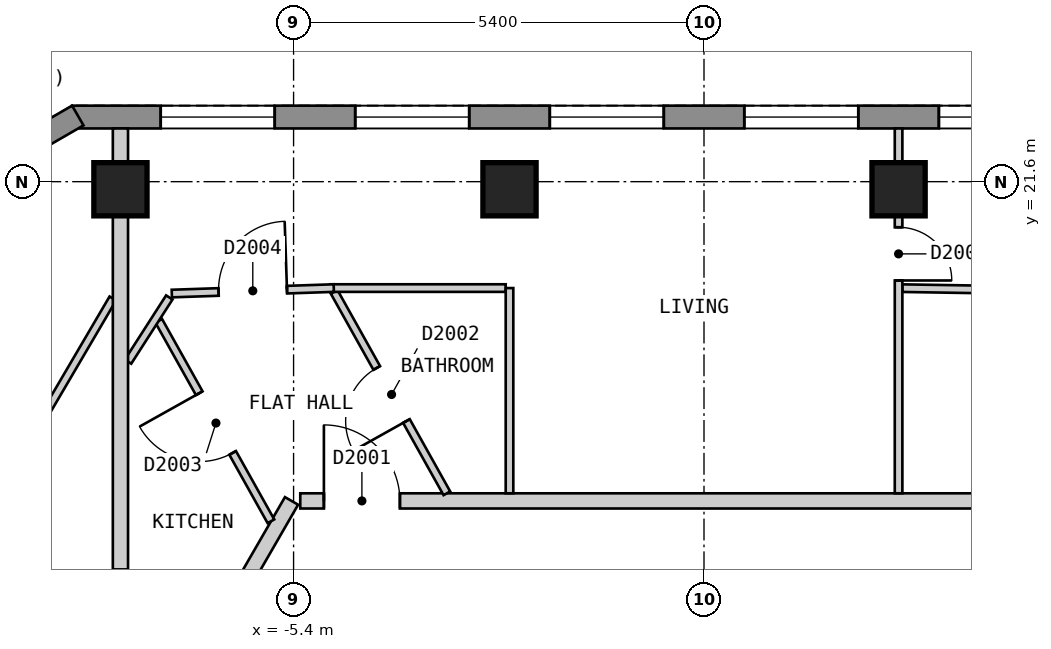
"""IFC4 building model, lengths in metres.
Left out: names, types, materials, properties, quantities, classifications, styles, units other than length and angle.
Written with IfcOpenShell. Run it as: python <this file> out.ifc"""

import sys

from ifc_helpers import new_model, si_unit, direction, frame, frame_2d, origin, origin_2d, place, context, subcontext, project, spatial, polyline, rectangle, outline, extrude, element, fill, save


model = new_model("IFC4")
c1 = context("Model", 3, precision=1e-05, world=origin(), true_north=direction((0.0, 1.0)))
c2 = subcontext(c1, "Body", "Model", "MODEL_VIEW")
j1 = project(units=[si_unit("LENGTHUNIT", "METRE"), si_unit("PLANEANGLEUNIT", "RADIAN")], contexts=[c1])
p1 = place(None, origin())
s1 = spatial("IfcSite", under=j1, at=p1, CompositionType="ELEMENT")
p2 = place(p1, origin())
s2 = spatial("IfcBuilding", under=s1, at=p2, CompositionType="ELEMENT")
p3 = place(p2, frame((0.0, 0.0, 238.8)))
s3 = spatial("IfcBuildingStorey", under=s2, at=p3, CompositionType="ELEMENT", Elevation=238.8)
for number, where, z_axis, x_axis in (
    (1, (2.56, 21.5, 0.0), (0.0, 0.0, 1.0), (-1.0, 0.0, 0.0)),
    (2, (-2.559, 21.5, 0.0), (0.0, 0.0, 1.0), (-1.0, 0.0, 0.0)),
    (3, (-7.678, 21.5, 0.0), (0.0, 0.0, 1.0), (-1.0, 0.0, 0.0)),
):
    element("IfcColumn", number, at=place(p3, frame(where, z_axis=z_axis, x_axis=x_axis)), inside=s3, PredefinedType="COLUMN", context=c2, shape_type="SweptSolid", body=[
        extrude(rectangle(XDim=0.7, YDim=0.7, at=origin_2d()), origin(), (0.0, 0.0, 1.0), 3.0),
    ])
p4 = place(p3, frame((8.314, 22.45, 0.0), z_axis=(0.0, 0.0, 1.0), x_axis=(-1.0, 0.0, 0.0)))
e4 = element("IfcWall", 4, at=p4, inside=s3, PredefinedType="SOLIDWALL", context=c2, shape_type="SweptSolid", body=[
    extrude(outline(polyline([(0.0, -0.15), (16.628, -0.15), (16.548, 0.15), (0.08, 0.15), (0.0, -0.15)])), origin(), (0.0, 0.0, 1.0), 2.7),
])
p5 = place(p4, frame((1.165, 0.0, 0.15)))
e5 = element("IfcOpeningElement", 5, at=p5, cuts=e4, PredefinedType="OPENING", context=c2, shape_type="SweptSolid", body=[
    extrude(rectangle(XDim=1.5, YDim=2.1, at=frame_2d((0.75, 1.05))), frame((0.0, 0.16, 0.0), z_axis=(0.0, -1.0, 0.0), x_axis=(1.0, 0.0, 0.0)), (0.0, 0.0, 1.0), 0.32),
])
p6 = place(p4, frame((3.724, 0.0, 0.15)))
e6 = element("IfcOpeningElement", 6, at=p6, cuts=e4, PredefinedType="OPENING", context=c2, shape_type="SweptSolid", body=[
    extrude(rectangle(XDim=1.5, YDim=2.1, at=frame_2d((0.75, 1.05))), frame((0.0, 0.16, 0.0), z_axis=(0.0, -1.0, 0.0), x_axis=(1.0, 0.0, 0.0)), (0.0, 0.0, 1.0), 0.32),
])
p7 = place(p4, frame((6.284, 0.0, 0.15)))
e7 = element("IfcOpeningElement", 7, at=p7, cuts=e4, PredefinedType="OPENING", context=c2, shape_type="SweptSolid", body=[
    extrude(rectangle(XDim=1.5, YDim=2.1, at=frame_2d((0.75, 1.05))), frame((0.0, 0.16, 0.0), z_axis=(0.0, -1.0, 0.0), x_axis=(1.0, 0.0, 0.0)), (0.0, 0.0, 1.0), 0.32),
])
p8 = place(p4, frame((8.843, 0.0, 0.15)))
e8 = element("IfcOpeningElement", 8, at=p8, cuts=e4, PredefinedType="OPENING", context=c2, shape_type="SweptSolid", body=[
    extrude(rectangle(XDim=1.5, YDim=2.1, at=frame_2d((0.75, 1.05))), frame((0.0, 0.16, 0.0), z_axis=(0.0, -1.0, 0.0), x_axis=(1.0, 0.0, 0.0)), (0.0, 0.0, 1.0), 0.32),
])
p9 = place(p4, frame((11.403, 0.0, 0.15)))
e9 = element("IfcOpeningElement", 9, at=p9, cuts=e4, PredefinedType="OPENING", context=c2, shape_type="SweptSolid", body=[
    extrude(rectangle(XDim=1.5, YDim=2.1, at=frame_2d((0.75, 1.05))), frame((0.0, 0.16, 0.0), z_axis=(0.0, -1.0, 0.0), x_axis=(1.0, 0.0, 0.0)), (0.0, 0.0, 1.0), 0.32),
])
p10 = place(p4, frame((13.962, 0.0, 0.15)))
e10 = element("IfcOpeningElement", 10, at=p10, cuts=e4, PredefinedType="OPENING", context=c2, shape_type="SweptSolid", body=[
    extrude(rectangle(XDim=1.5, YDim=2.1, at=frame_2d((0.75, 1.05))), frame((0.0, 0.16, 0.0), z_axis=(0.0, -1.0, 0.0), x_axis=(1.0, 0.0, 0.0)), (0.0, 0.0, 1.0), 0.32),
])
p11 = place(p3, frame((-8.239, 22.47, 0.0), z_axis=(0.0, 0.0, 1.0), x_axis=(-0.866022959057, -0.500004234368, 0.0)))
e11 = element("IfcWall", 11, at=p11, inside=s3, PredefinedType="SOLIDWALL", context=c2, shape_type="SweptSolid", body=[
    extrude(outline(polyline([(0.0, -0.15), (5.0, -0.15), (4.92, 0.15), (0.08, 0.15), (0.0, -0.15)])), origin(), (0.0, 0.0, 1.0), 2.7),
])
p12 = place(p11, frame((0.65, 0.0, 0.15)))
e12 = element("IfcOpeningElement", 12, at=p12, cuts=e11, PredefinedType="OPENING", context=c2, shape_type="SweptSolid", body=[
    extrude(rectangle(XDim=1.2, YDim=2.1, at=frame_2d((0.6, 1.05))), frame((0.0, 0.16, 0.0), z_axis=(0.0, -1.0, 0.0), x_axis=(1.0, 0.0, 0.0)), (0.0, 0.0, 1.0), 0.32),
])
p13 = place(p11, frame((3.149, 0.0, 0.15)))
e13 = element("IfcOpeningElement", 13, at=p13, cuts=e11, PredefinedType="OPENING", context=c2, shape_type="SweptSolid", body=[
    extrude(rectangle(XDim=1.2, YDim=2.1, at=frame_2d((0.6, 1.05))), frame((0.0, 0.16, 0.0), z_axis=(0.0, -1.0, 0.0), x_axis=(1.0, 0.0, 0.0)), (0.0, 0.0, 1.0), 0.32),
])
p14 = place(p3, frame((-5.312, 17.4, 0.0), z_axis=(0.0, 0.0, 1.0), x_axis=(1.0, 0.0, 0.0)))
e14 = element("IfcWall", 14, at=p14, inside=s3, PredefinedType="PARTITIONING", context=c2, shape_type="SweptSolid", body=[
    extrude(rectangle(XDim=10.739, YDim=0.2, at=frame_2d((5.37, 0.0))), origin(), (0.0, 0.0, 1.0), 2.7),
])
p15 = place(p14, frame((0.311, 0.0, 0.0)))
e15 = element("IfcOpeningElement", 15, at=p15, cuts=e14, PredefinedType="OPENING", context=c2, shape_type="SweptSolid", body=[
    extrude(rectangle(XDim=1.0, YDim=2.1, at=frame_2d((0.5, 1.05))), frame((0.0, 0.11, 0.0), z_axis=(0.0, -1.0, 0.0), x_axis=(1.0, 0.0, 0.0)), (0.0, 0.0, 1.0), 0.22),
])
p16 = place(p3, frame((-10.854, 8.0, 0.0), z_axis=(0.0, 0.0, 1.0), x_axis=(0.499997637144, 0.866026767976, 0.0)))
e16 = element("IfcWall", 16, at=p16, inside=s3, PredefinedType="PARTITIONING", context=c2, shape_type="SweptSolid", body=[
    extrude(rectangle(XDim=10.854, YDim=0.2, at=frame_2d((5.427, 0.0))), origin(), (0.0, 0.0, 1.0), 2.7),
])
p17 = place(p16, frame((0.612, 0.0, 0.0)))
e17 = element("IfcOpeningElement", 17, at=p17, cuts=e16, PredefinedType="OPENING", context=c2, shape_type="SweptSolid", body=[
    extrude(rectangle(XDim=1.0, YDim=2.1, at=frame_2d((0.5, 1.05))), frame((0.0, 0.11, 0.0), z_axis=(0.0, -1.0, 0.0), x_axis=(1.0, 0.0, 0.0)), (0.0, 0.0, 1.0), 0.22),
])
p18 = place(p3, frame((-7.174, 19.769, 0.0), z_axis=(0.0, 0.0, 1.0), x_axis=(0.488445917321, -0.872594170192, 0.0)))
e18 = element("IfcWall", 18, at=p18, inside=s3, PredefinedType="PARTITIONING", context=c2, shape_type="SweptSolid", body=[
    extrude(rectangle(XDim=3.022, YDim=0.1, at=frame_2d((1.511, 0.0))), origin(), (0.0, 0.0, 1.0), 2.7),
])
p19 = place(p18, frame((1.091, 0.0, 0.0)))
e19 = element("IfcOpeningElement", 19, at=p19, cuts=e18, PredefinedType="OPENING", context=c2, shape_type="SweptSolid", body=[
    extrude(rectangle(XDim=0.9, YDim=2.1, at=frame_2d((0.45, 1.05))), frame((0.0, 0.06, 0.0), z_axis=(0.0, -1.0, 0.0), x_axis=(1.0, 0.0, 0.0)), (0.0, 0.0, 1.0), 0.12),
])
p20 = place(p3, frame((-4.866, 20.15, 0.0), z_axis=(0.0, 0.0, 1.0), x_axis=(0.488343837593, -0.872651302804, 0.0)))
e20 = element("IfcWall", 20, at=p20, inside=s3, PredefinedType="PARTITIONING", context=c2, shape_type="SweptSolid", body=[
    extrude(rectangle(XDim=3.037, YDim=0.1, at=frame_2d((1.518, 0.0))), origin(), (0.0, 0.0, 1.0), 2.7),
])
p21 = place(p20, frame((1.147, 0.0, 0.0)))
e21 = element("IfcOpeningElement", 21, at=p21, cuts=e20, PredefinedType="OPENING", context=c2, shape_type="SweptSolid", body=[
    extrude(rectangle(XDim=0.8, YDim=2.1, at=frame_2d((0.4, 1.05))), frame((0.0, 0.06, 0.0), z_axis=(0.0, -1.0, 0.0), x_axis=(1.0, 0.0, 0.0)), (0.0, 0.0, 1.0), 0.12),
])
p22 = place(p3, frame((2.61, 20.199, 0.0), z_axis=(0.0, 0.0, 1.0), x_axis=(0.99986918525, -0.016174436206, 0.0)))
e22 = element("IfcWall", 22, at=p22, inside=s3, PredefinedType="PARTITIONING", context=c2, shape_type="SweptSolid", body=[
    extrude(rectangle(XDim=4.392, YDim=0.1, at=frame_2d((2.196, 0.0))), origin(), (0.0, 0.0, 1.0), 2.7),
])
p23 = place(p22, frame((1.771, 0.0, 0.0)))
e23 = element("IfcOpeningElement", 23, at=p23, cuts=e22, PredefinedType="OPENING", context=c2, shape_type="SweptSolid", body=[
    extrude(rectangle(XDim=0.8, YDim=2.1, at=frame_2d((0.4, 1.05))), frame((0.0, 0.06, 0.0), z_axis=(0.0, -1.0, 0.0), x_axis=(1.0, 0.0, 0.0)), (0.0, 0.0, 1.0), 0.12),
])
p24 = place(p3, frame((-4.914, 20.2, 0.0), z_axis=(0.0, 0.0, 1.0), x_axis=(1.0, 0.0, 0.0)))
e24 = element("IfcWall", 24, at=p24, inside=s3, PredefinedType="PARTITIONING", context=c2, shape_type="SweptSolid", body=[
    extrude(rectangle(XDim=2.305, YDim=0.1, at=frame_2d((1.153, 0.0))), origin(), (0.0, 0.0, 1.0), 2.7),
])
p25 = place(p3, frame((-7.578, 19.232, 0.0), z_axis=(0.0, 0.0, 1.0), x_axis=(0.540597871913, 0.841281130707, 0.0)))
e25 = element("IfcWall", 25, at=p25, inside=s3, PredefinedType="PARTITIONING", context=c2, shape_type="SweptSolid", body=[
    extrude(rectangle(XDim=1.004, YDim=0.1, at=frame_2d((0.502, 0.0))), origin(), (0.0, 0.0, 1.0), 2.7),
])
p26 = place(p3, frame((-11.934, 12.981, 0.0), z_axis=(0.0, 0.0, 1.0), x_axis=(0.506072703404, 0.862490822484, 0.0)))
e26 = element("IfcWall", 26, at=p26, inside=s3, PredefinedType="PARTITIONING", context=c2, shape_type="SweptSolid", body=[
    extrude(rectangle(XDim=8.212, YDim=0.1, at=frame_2d((4.106, 0.0))), origin(), (0.0, 0.0, 1.0), 2.7),
])
p27 = place(p3, frame((2.56, 17.5, 0.0), z_axis=(0.0, 0.0, 1.0), x_axis=(0.0, 1.0, 0.0)))
e27 = element("IfcWall", 27, at=p27, inside=s3, PredefinedType="PARTITIONING", context=c2, shape_type="SweptSolid", body=[
    extrude(rectangle(XDim=4.8, YDim=0.1, at=frame_2d((2.4, 0.0))), origin(), (0.0, 0.0, 1.0), 2.7),
])
p28 = place(p27, frame((2.8, 0.0, 0.0)))
e28 = element("IfcOpeningElement", 28, at=p28, cuts=e27, PredefinedType="OPENING", context=c2, shape_type="SweptSolid", body=[
    extrude(rectangle(XDim=0.7, YDim=2.1, at=frame_2d((0.35, 1.05))), frame((0.0, 0.06, 0.0), z_axis=(0.0, -1.0, 0.0), x_axis=(1.0, 0.0, 0.0)), (0.0, 0.0, 1.0), 0.12),
])
p29 = place(p3, frame((-2.559, 17.5, 0.0), z_axis=(0.0, 0.0, 1.0), x_axis=(0.0, 1.0, 0.0)))
e29 = element("IfcWall", 29, at=p29, inside=s3, PredefinedType="PARTITIONING", context=c2, shape_type="SweptSolid", body=[
    extrude(rectangle(XDim=2.7, YDim=0.1, at=frame_2d((1.35, 0.0))), origin(), (0.0, 0.0, 1.0), 2.7),
])
p30 = place(p3, frame((-7.002, 20.128, 0.0), z_axis=(0.0, 0.0, 1.0), x_axis=(0.999429293715, 0.033779977274, 0.0)))
e30 = element("IfcWall", 30, at=p30, inside=s3, PredefinedType="PARTITIONING", context=c2, shape_type="SweptSolid", body=[
    extrude(rectangle(XDim=2.132, YDim=0.1, at=frame_2d((1.066, 0.0))), origin(), (0.0, 0.0, 1.0), 2.7),
])
p31 = place(p30, frame((0.616, 0.0, 0.0)))
e31 = element("IfcOpeningElement", 31, at=p31, cuts=e30, PredefinedType="OPENING", context=c2, shape_type="SweptSolid", body=[
    extrude(rectangle(XDim=0.9, YDim=2.1, at=frame_2d((0.45, 1.05))), frame((0.0, 0.06, 0.0), z_axis=(0.0, -1.0, 0.0), x_axis=(1.0, 0.0, 0.0)), (0.0, 0.0, 1.0), 0.12),
])
p32 = place(p3, frame((-7.678, 16.499, 0.0), z_axis=(0.0, 0.0, 1.0), x_axis=(0.0, 1.0, 0.0)))
e32 = element("IfcWall", 32, at=p32, inside=s3, PredefinedType="PARTITIONING", context=c2, shape_type="SweptSolid", body=[
    extrude(rectangle(XDim=5.801, YDim=0.2, at=frame_2d((2.9, 0.0))), origin(), (0.0, 0.0, 1.0), 2.7),
])
p33 = place(p6, origin())
e33 = element("IfcWindow", 33, at=p33, inside=s3, PartitioningType="SINGLE_PANEL", PredefinedType="WINDOW", context=c2, shape_type="SweptSolid", body=[
    extrude(rectangle(XDim=1.5, YDim=2.1, at=frame_2d((0.75, 1.05))), frame((0.0, 0.03, 0.0), z_axis=(0.0, -1.0, 0.0), x_axis=(1.0, 0.0, 0.0)), (0.0, 0.0, 1.0), 0.06),
])
fill(e6, e33)
p34 = place(p7, origin())
e34 = element("IfcWindow", 34, at=p34, inside=s3, PartitioningType="SINGLE_PANEL", PredefinedType="WINDOW", context=c2, shape_type="SweptSolid", body=[
    extrude(rectangle(XDim=1.5, YDim=2.1, at=frame_2d((0.75, 1.05))), frame((0.0, 0.03, 0.0), z_axis=(0.0, -1.0, 0.0), x_axis=(1.0, 0.0, 0.0)), (0.0, 0.0, 1.0), 0.06),
])
fill(e7, e34)
p35 = place(p8, origin())
e35 = element("IfcWindow", 35, at=p35, inside=s3, PartitioningType="SINGLE_PANEL", PredefinedType="WINDOW", context=c2, shape_type="SweptSolid", body=[
    extrude(rectangle(XDim=1.5, YDim=2.1, at=frame_2d((0.75, 1.05))), frame((0.0, 0.03, 0.0), z_axis=(0.0, -1.0, 0.0), x_axis=(1.0, 0.0, 0.0)), (0.0, 0.0, 1.0), 0.06),
])
fill(e8, e35)
p36 = place(p9, origin())
e36 = element("IfcWindow", 36, at=p36, inside=s3, PartitioningType="SINGLE_PANEL", PredefinedType="WINDOW", context=c2, shape_type="SweptSolid", body=[
    extrude(rectangle(XDim=1.5, YDim=2.1, at=frame_2d((0.75, 1.05))), frame((0.0, 0.03, 0.0), z_axis=(0.0, -1.0, 0.0), x_axis=(1.0, 0.0, 0.0)), (0.0, 0.0, 1.0), 0.06),
])
fill(e9, e36)
p37 = place(p10, origin())
e37 = element("IfcWindow", 37, at=p37, inside=s3, PartitioningType="SINGLE_PANEL", PredefinedType="WINDOW", context=c2, shape_type="SweptSolid", body=[
    extrude(rectangle(XDim=1.5, YDim=2.1, at=frame_2d((0.75, 1.05))), frame((0.0, 0.03, 0.0), z_axis=(0.0, -1.0, 0.0), x_axis=(1.0, 0.0, 0.0)), (0.0, 0.0, 1.0), 0.06),
])
fill(e10, e37)
p38 = place(p15, origin())
e38 = element("IfcDoor", 38, at=p38, inside=s3, OperationType="SINGLE_SWING_LEFT", PredefinedType="DOOR", context=c2, shape_type="SweptSolid", body=[
    extrude(rectangle(XDim=1.0, YDim=2.1, at=frame_2d((0.5, 1.05))), frame((0.0, 0.025, 0.0), z_axis=(0.0, -1.0, 0.0), x_axis=(1.0, 0.0, 0.0)), (0.0, 0.0, 1.0), 0.05),
])
fill(e15, e38)
p39 = place(p21, origin())
e39 = element("IfcDoor", 39, at=p39, inside=s3, OperationType="SINGLE_SWING_RIGHT", PredefinedType="DOOR", context=c2, shape_type="SweptSolid", body=[
    extrude(rectangle(XDim=0.8, YDim=2.1, at=frame_2d((0.4, 1.05))), frame((0.0, 0.025, 0.0), z_axis=(0.0, -1.0, 0.0), x_axis=(1.0, 0.0, 0.0)), (0.0, 0.0, 1.0), 0.05),
])
fill(e21, e39)
p40 = place(p19, origin())
e40 = element("IfcDoor", 40, at=p40, inside=s3, OperationType="SINGLE_SWING_LEFT", PredefinedType="DOOR", context=c2, shape_type="SweptSolid", body=[
    extrude(rectangle(XDim=0.9, YDim=2.1, at=frame_2d((0.45, 1.05))), frame((0.0, 0.025, 0.0), z_axis=(0.0, -1.0, 0.0), x_axis=(1.0, 0.0, 0.0)), (0.0, 0.0, 1.0), 0.05),
])
fill(e19, e40)
p41 = place(p31, origin())
e41 = element("IfcDoor", 41, at=p41, inside=s3, OperationType="SINGLE_SWING_RIGHT", PredefinedType="DOOR", context=c2, shape_type="SweptSolid", body=[
    extrude(rectangle(XDim=0.9, YDim=2.1, at=frame_2d((0.45, 1.05))), frame((0.0, 0.025, 0.0), z_axis=(0.0, -1.0, 0.0), x_axis=(1.0, 0.0, 0.0)), (0.0, 0.0, 1.0), 0.05),
])
fill(e31, e41)
p42 = place(p28, origin())
e42 = element("IfcDoor", 42, at=p42, inside=s3, OperationType="SINGLE_SWING_LEFT", PredefinedType="DOOR", context=c2, shape_type="SweptSolid", body=[
    extrude(rectangle(XDim=0.7, YDim=2.1, at=frame_2d((0.35, 1.05))), frame((0.0, 0.025, 0.0), z_axis=(0.0, -1.0, 0.0), x_axis=(1.0, 0.0, 0.0)), (0.0, 0.0, 1.0), 0.05),
])
fill(e28, e42)
save(model, sys.argv[1])
